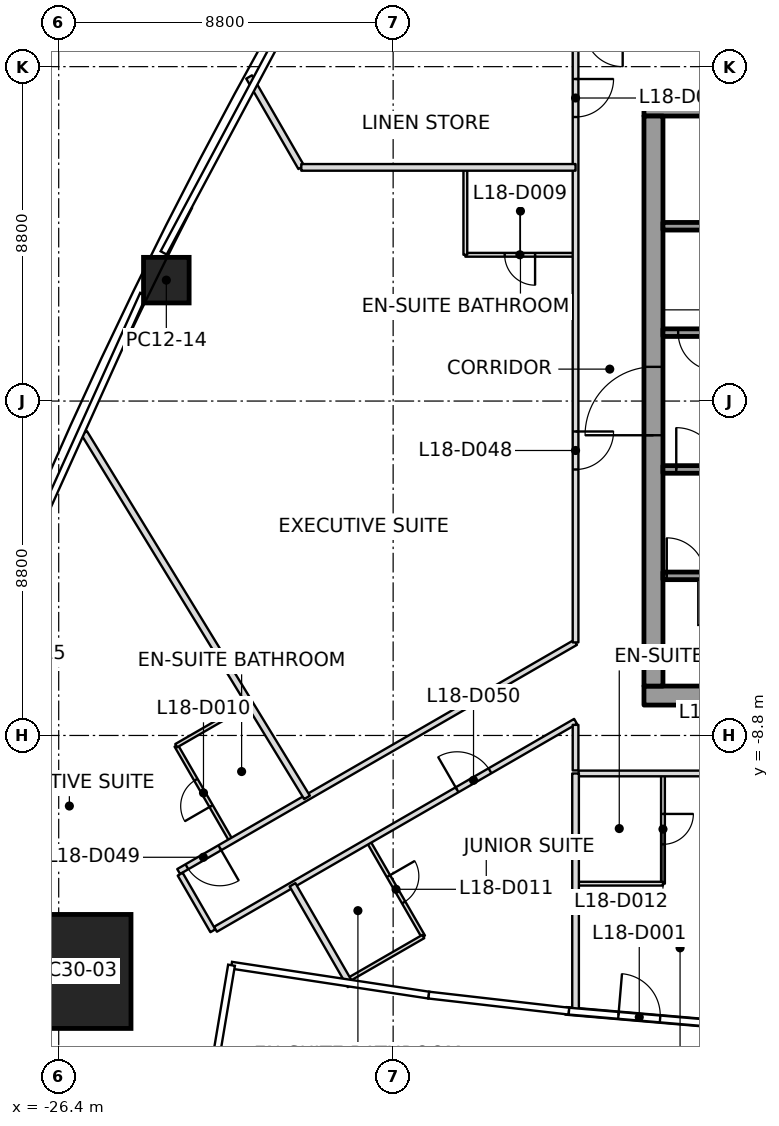
"""IFC4 building model, lengths in metres.
Left out: names, types, materials, properties, quantities, classifications, styles, units other than length and angle.
Written with IfcOpenShell. Run it as: python <this file> out.ifc"""

import sys

from ifc_helpers import new_model, si_unit, direction, frame, frame_2d, origin, origin_2d, place, context, subcontext, project, spatial, rectangle, extrude, element, fill, save


model = new_model("IFC4")
c1 = context("Model", 3, precision=1e-05, world=origin(), true_north=direction((0.0, 1.0)))
c2 = subcontext(c1, "Body", "Model", "MODEL_VIEW")
j1 = project(units=[si_unit("LENGTHUNIT", "METRE"), si_unit("PLANEANGLEUNIT", "RADIAN")], contexts=[c1])
p1 = place(None, origin())
s1 = spatial("IfcSite", under=j1, at=p1, CompositionType="ELEMENT")
p2 = place(p1, origin())
s2 = spatial("IfcBuilding", under=s1, at=p2, CompositionType="ELEMENT")
p3 = place(p2, frame((0.0, 0.0, 88.7)))
s3 = spatial("IfcBuildingStorey", under=s2, at=p3, CompositionType="ELEMENT", Elevation=88.7)
p4 = place(p3, frame((-25.998, -15.01, 0.0), z_axis=(0.030466109479, 0.017607037296, 0.999380712447), x_axis=(0.999535800346, -0.000536667047, -0.03046138236)))
e1 = element("IfcColumn", 1, at=p4, inside=s3, PredefinedType="COLUMN", context=c2, shape_type="SweptSolid", body=[
    extrude(rectangle(XDim=3.0, YDim=3.0, at=origin_2d()), origin(), (0.0, 0.0, 1.0), 3.702),
])
p5 = place(p3, frame((-23.568, 3.182, 0.0), z_axis=(0.015240683228, 0.002309194428, 0.99988118754), x_axis=(0.441368451021, 0.897282817129, -0.008799802757)))
e2 = element("IfcColumn", 2, at=p5, inside=s3, PredefinedType="COLUMN", context=c2, shape_type="SweptSolid", body=[
    extrude(rectangle(XDim=1.2, YDim=1.2, at=origin_2d()), origin(), (0.0, 0.0, 1.0), 3.7),
])
p6 = place(p3, frame((-27.284, -5.052, 0.0), z_axis=(0.019460669214, 0.010950749456, 0.999750650632), x_axis=(0.380819123517, 0.924483192548, -0.017539152187)))
e3 = element("IfcColumn", 3, at=p6, inside=s3, PredefinedType="COLUMN", context=c2, shape_type="SweptSolid", body=[
    extrude(rectangle(XDim=1.2, YDim=1.2, at=origin_2d()), origin(), (0.0, 0.0, 1.0), 3.701),
])
p7 = place(p3, frame((-11.0, -7.75, 0.0), z_axis=(0.0, 0.0, 1.0), x_axis=(1.0, 0.0, 0.0)))
e4 = element("IfcWall", 4, at=p7, inside=s3, PredefinedType="SHEAR", context=c2, shape_type="SweptSolid", body=[
    extrude(rectangle(XDim=22.0, YDim=0.5, at=frame_2d((11.0, 0.0))), origin(), (0.0, 0.0, 1.0), 3.7),
])
p8 = place(p7, frame((10.45, 0.0, 0.0)))
e5 = element("IfcOpeningElement", 5, at=p8, cuts=e4, PredefinedType="OPENING", context=c2, shape_type="SweptSolid", body=[
    extrude(rectangle(XDim=1.1, YDim=2.1, at=frame_2d((0.55, 1.05))), frame((0.0, 0.25, 0.0), z_axis=(0.0, -1.0, 0.0), x_axis=(1.0, 0.0, 0.0)), (0.0, 0.0, 1.0), 0.5),
])
p9 = place(p3, frame((-11.0, 7.75, 0.0), z_axis=(0.0, 0.0, 1.0), x_axis=(1.0, 0.0, 0.0)))
e6 = element("IfcWall", 6, at=p9, inside=s3, PredefinedType="SHEAR", context=c2, shape_type="SweptSolid", body=[
    extrude(rectangle(XDim=22.0, YDim=0.5, at=frame_2d((11.0, 0.0))), origin(), (0.0, 0.0, 1.0), 3.7),
])
p10 = place(p9, frame((10.45, 0.0, 0.0)))
e7 = element("IfcOpeningElement", 7, at=p10, cuts=e6, PredefinedType="OPENING", context=c2, shape_type="SweptSolid", body=[
    extrude(rectangle(XDim=1.1, YDim=2.1, at=frame_2d((0.55, 1.05))), frame((0.0, 0.25, 0.0), z_axis=(0.0, -1.0, 0.0), x_axis=(1.0, 0.0, 0.0)), (0.0, 0.0, 1.0), 0.5),
])
p11 = place(p3, frame((-10.75, -7.5, 0.0), z_axis=(0.0, 0.0, 1.0), x_axis=(0.0, 1.0, 0.0)))
e8 = element("IfcWall", 8, at=p11, inside=s3, PredefinedType="SHEAR", context=c2, shape_type="SweptSolid", body=[
    extrude(rectangle(XDim=15.0, YDim=0.5, at=frame_2d((7.5, 0.0))), origin(), (0.0, 0.0, 1.0), 3.7),
])
p12 = place(p11, frame((6.6, 0.0, 0.0)))
e9 = element("IfcOpeningElement", 9, at=p12, cuts=e8, PredefinedType="OPENING", context=c2, shape_type="SweptSolid", body=[
    extrude(rectangle(XDim=1.8, YDim=2.1, at=frame_2d((0.9, 1.05))), frame((0.0, 0.25, 0.0), z_axis=(0.0, -1.0, 0.0), x_axis=(1.0, 0.0, 0.0)), (0.0, 0.0, 1.0), 0.5),
])
p13 = place(p3, frame((-13.063, -16.047, 0.0), z_axis=(0.0, 0.0, 1.0), x_axis=(0.996355943682, -0.085292634444, 0.0)))
e10 = element("IfcWall", 10, at=p13, inside=s3, PredefinedType="SOLIDWALL", context=c2, shape_type="SweptSolid", body=[
    extrude(rectangle(XDim=3.893, YDim=0.2, at=frame_2d((1.946, 0.0))), origin(), (0.0, 0.0, 1.0), 3.017),
])
p14 = place(p13, frame((1.396, 0.0, 0.0)))
e11 = element("IfcOpeningElement", 11, at=p14, cuts=e10, PredefinedType="OPENING", context=c2, shape_type="SweptSolid", body=[
    extrude(rectangle(XDim=1.1, YDim=2.1, at=frame_2d((0.55, 1.05))), frame((0.0, 0.1, 0.0), z_axis=(0.0, -1.0, 0.0), x_axis=(1.0, 0.0, 0.0)), (0.0, 0.0, 1.0), 0.2),
])
p15 = place(p3, frame((-10.5, -4.6, 0.0), z_axis=(0.0, 0.0, 1.0), x_axis=(1.0, 0.0, 0.0)))
e12 = element("IfcWall", 12, at=p15, inside=s3, PredefinedType="SOLIDWALL", context=c2, shape_type="SweptSolid", body=[
    extrude(rectangle(XDim=1.8, YDim=0.2, at=frame_2d((0.9, 0.0))), origin(), (0.0, 0.0, 1.0), 3.55),
])
p16 = place(p15, frame((0.1, 0.0, 0.0)))
e13 = element("IfcOpeningElement", 13, at=p16, cuts=e12, PredefinedType="OPENING", context=c2, shape_type="SweptSolid", body=[
    extrude(rectangle(XDim=1.0, YDim=2.1, at=frame_2d((0.5, 1.05))), frame((0.0, 0.1, 0.0), z_axis=(0.0, -1.0, 0.0), x_axis=(1.0, 0.0, 0.0)), (0.0, 0.0, 1.0), 0.2),
])
p17 = place(p3, frame((-10.5, -1.8, 0.0), z_axis=(0.0, 0.0, 1.0), x_axis=(1.0, 0.0, 0.0)))
e14 = element("IfcWall", 14, at=p17, inside=s3, PredefinedType="SOLIDWALL", context=c2, shape_type="SweptSolid", body=[
    extrude(rectangle(XDim=1.8, YDim=0.2, at=frame_2d((0.9, 0.0))), origin(), (0.0, 0.0, 1.0), 3.55),
])
p18 = place(p17, frame((0.35, 0.0, 0.0)))
e15 = element("IfcOpeningElement", 15, at=p18, cuts=e14, PredefinedType="OPENING", context=c2, shape_type="SweptSolid", body=[
    extrude(rectangle(XDim=1.1, YDim=2.1, at=frame_2d((0.55, 1.05))), frame((0.0, 0.1, 0.0), z_axis=(0.0, -1.0, 0.0), x_axis=(1.0, 0.0, 0.0)), (0.0, 0.0, 1.0), 0.2),
])
p19 = place(p3, frame((-8.7, 1.8, 0.0), z_axis=(0.0, 0.0, 1.0), x_axis=(-1.0, 0.0, 0.0)))
e16 = element("IfcWall", 16, at=p19, inside=s3, PredefinedType="SOLIDWALL", context=c2, shape_type="SweptSolid", body=[
    extrude(rectangle(XDim=1.8, YDim=0.2, at=frame_2d((0.9, 0.0))), origin(), (0.0, 0.0, 1.0), 3.55),
])
p20 = place(p19, frame((0.4, 0.0, 0.0)))
e17 = element("IfcOpeningElement", 17, at=p20, cuts=e16, PredefinedType="OPENING", context=c2, shape_type="SweptSolid", body=[
    extrude(rectangle(XDim=1.0, YDim=2.1, at=frame_2d((0.5, 1.05))), frame((0.0, 0.1, 0.0), z_axis=(0.0, -1.0, 0.0), x_axis=(1.0, 0.0, 0.0)), (0.0, 0.0, 1.0), 0.2),
])
p21 = place(p3, frame((-8.7, 4.6, 0.0), z_axis=(0.0, 0.0, 1.0), x_axis=(-1.0, 0.0, 0.0)))
e18 = element("IfcWall", 18, at=p21, inside=s3, PredefinedType="SOLIDWALL", context=c2, shape_type="SweptSolid", body=[
    extrude(rectangle(XDim=1.8, YDim=0.2, at=frame_2d((0.9, 0.0))), origin(), (0.0, 0.0, 1.0), 3.55),
])
p22 = place(p3, frame((-19.866, -10.43, 0.0), z_axis=(0.0, 0.0, 1.0), x_axis=(-0.521604569483, 0.853187361073, 0.0)))
e19 = element("IfcWall", 19, at=p22, inside=s3, PredefinedType="PARTITIONING", context=c2, shape_type="SweptSolid", body=[
    extrude(rectangle(XDim=11.245, YDim=0.175, at=frame_2d((5.622, 0.0))), origin(), (0.0, 0.0, 1.0), 2.934),
])
p23 = place(p3, frame((-21.39, 8.528, 0.0), z_axis=(0.0, 0.0, 1.0), x_axis=(0.500058417122, -0.865991674016, 0.0)))
e20 = element("IfcWall", 20, at=p23, inside=s3, PredefinedType="PARTITIONING", context=c2, shape_type="SweptSolid", body=[
    extrude(rectangle(XDim=2.747, YDim=0.175, at=frame_2d((1.374, 0.0))), origin(), (0.0, 0.0, 1.0), 2.934),
])
p24 = place(p3, frame((-20.017, 6.149, 0.0), z_axis=(0.0, 0.0, 1.0), x_axis=(1.0, 0.0, 0.0)))
e21 = element("IfcWall", 21, at=p24, inside=s3, PredefinedType="PARTITIONING", context=c2, shape_type="SweptSolid", body=[
    extrude(rectangle(XDim=7.217, YDim=0.175, at=frame_2d((3.608, 0.0))), origin(), (0.0, 0.0, 1.0), 3.093),
])
p25 = place(p3, frame((-20.248, -12.729, 0.0), z_axis=(0.0, 0.0, 1.0), x_axis=(0.499957248001, -0.866050085256, 0.0)))
e22 = element("IfcWall", 22, at=p25, inside=s3, PredefinedType="PARTITIONING", context=c2, shape_type="SweptSolid", body=[
    extrude(rectangle(XDim=3.06, YDim=0.175, at=frame_2d((1.53, 0.0))), origin(), (0.0, 0.0, 1.0), 3.15),
])
p26 = place(p3, frame((-12.8, -9.8, 0.0), z_axis=(0.0, 0.0, 1.0), x_axis=(0.0, -1.0, 0.0)))
e23 = element("IfcWall", 23, at=p26, inside=s3, PredefinedType="PARTITIONING", context=c2, shape_type="SweptSolid", body=[
    extrude(rectangle(XDim=6.271, YDim=0.175, at=frame_2d((3.135, 0.0))), origin(), (0.0, 0.0, 1.0), 3.15),
])
p27 = place(p3, frame((-12.8, -6.351, 0.0), z_axis=(0.0, 0.0, 1.0), x_axis=(-0.86602308164, -0.500004022051, 0.0)))
e24 = element("IfcWall", 24, at=p27, inside=s3, PredefinedType="PARTITIONING", context=c2, shape_type="SweptSolid", body=[
    extrude(rectangle(XDim=12.059, YDim=0.15, at=frame_2d((6.03, 0.0))), origin(), (0.0, 0.0, 1.0), 2.947),
])
p28 = place(p27, frame((10.809, 0.0, 0.0)))
e25 = element("IfcOpeningElement", 25, at=p28, cuts=e24, PredefinedType="OPENING", context=c2, shape_type="SweptSolid", body=[
    extrude(rectangle(XDim=1.0, YDim=2.1, at=frame_2d((0.5, 1.05))), frame((0.0, 0.075, 0.0), z_axis=(0.0, -1.0, 0.0), x_axis=(1.0, 0.0, 0.0)), (0.0, 0.0, 1.0), 0.15),
])
p29 = place(p3, frame((-23.204, -12.45, 0.0), z_axis=(0.0, 0.0, 1.0), x_axis=(0.500062383118, -0.865989383878, 0.0)))
e26 = element("IfcWall", 26, at=p29, inside=s3, PredefinedType="PARTITIONING", context=c2, shape_type="SweptSolid", body=[
    extrude(rectangle(XDim=1.72, YDim=0.15, at=frame_2d((0.86, 0.0))), origin(), (0.0, 0.0, 1.0), 2.797),
])
p30 = place(p3, frame((-22.274, -13.899, 0.0), z_axis=(0.0, 0.0, 1.0), x_axis=(0.866012401956, 0.500022519152, 0.0)))
e27 = element("IfcWall", 27, at=p30, inside=s3, PredefinedType="PARTITIONING", context=c2, shape_type="SweptSolid", body=[
    extrude(rectangle(XDim=10.94, YDim=0.15, at=frame_2d((5.47, 0.0))), origin(), (0.0, 0.0, 1.0), 2.797),
])
p31 = place(p30, frame((7.34, 0.0, 0.0)))
e28 = element("IfcOpeningElement", 28, at=p31, cuts=e27, PredefinedType="OPENING", context=c2, shape_type="SweptSolid", body=[
    extrude(rectangle(XDim=1.0, YDim=2.1, at=frame_2d((0.5, 1.05))), frame((0.0, 0.075, 0.0), z_axis=(0.0, -1.0, 0.0), x_axis=(1.0, 0.0, 0.0)), (0.0, 0.0, 1.0), 0.15),
])
p32 = place(p3, frame((-12.8, -8.521, 0.0), z_axis=(0.0, 0.0, 1.0), x_axis=(0.0, -1.0, 0.0)))
e29 = element("IfcWall", 29, at=p32, inside=s3, PredefinedType="PARTITIONING", context=c2, shape_type="SweptSolid", body=[
    extrude(rectangle(XDim=1.199, YDim=0.15, at=frame_2d((0.6, 0.0))), origin(), (0.0, 0.0, 1.0), 2.797),
])
p33 = place(p3, frame((-12.8, 9.72, 0.0), z_axis=(0.0, 0.0, 1.0), x_axis=(0.0, -1.0, 0.0)))
e30 = element("IfcWall", 30, at=p33, inside=s3, PredefinedType="PARTITIONING", context=c2, shape_type="SweptSolid", body=[
    extrude(rectangle(XDim=16.071, YDim=0.15, at=frame_2d((8.035, 0.0))), origin(), (0.0, 0.0, 1.0), 2.947),
])
p34 = place(p33, frame((1.245, 0.0, 0.0)))
e31 = element("IfcOpeningElement", 31, at=p34, cuts=e30, PredefinedType="OPENING", context=c2, shape_type="SweptSolid", body=[
    extrude(rectangle(XDim=1.0, YDim=2.1, at=frame_2d((0.5, 1.05))), frame((0.0, 0.075, 0.0), z_axis=(0.0, -1.0, 0.0), x_axis=(1.0, 0.0, 0.0)), (0.0, 0.0, 1.0), 0.15),
])
p35 = place(p33, frame((10.521, 0.0, 0.0)))
e32 = element("IfcOpeningElement", 32, at=p35, cuts=e30, PredefinedType="OPENING", context=c2, shape_type="SweptSolid", body=[
    extrude(rectangle(XDim=1.0, YDim=2.1, at=frame_2d((0.5, 1.05))), frame((0.0, 0.075, 0.0), z_axis=(0.0, -1.0, 0.0), x_axis=(1.0, 0.0, 0.0)), (0.0, 0.0, 1.0), 0.15),
])
p36 = place(p3, frame((-12.72, -9.8, 0.0), z_axis=(0.0, 0.0, 1.0), x_axis=(1.0, 0.0, 0.0)))
e33 = element("IfcWall", 33, at=p36, inside=s3, PredefinedType="PARTITIONING", context=c2, shape_type="SweptSolid", body=[
    extrude(rectangle(XDim=9.22, YDim=0.15, at=frame_2d((4.61, 0.0))), origin(), (0.0, 0.0, 1.0), 3.017),
])
p37 = place(p36, frame((3.37, 0.0, 0.0)))
e34 = element("IfcOpeningElement", 34, at=p37, cuts=e33, PredefinedType="OPENING", context=c2, shape_type="SweptSolid", body=[
    extrude(rectangle(XDim=1.0, YDim=2.1, at=frame_2d((0.5, 1.05))), frame((0.0, 0.075, 0.0), z_axis=(0.0, -1.0, 0.0), x_axis=(1.0, 0.0, 0.0)), (0.0, 0.0, 1.0), 0.15),
])
p38 = place(p36, frame((8.02, 0.0, 0.0)))
e35 = element("IfcOpeningElement", 35, at=p38, cuts=e33, PredefinedType="OPENING", context=c2, shape_type="SweptSolid", body=[
    extrude(rectangle(XDim=1.0, YDim=2.1, at=frame_2d((0.5, 1.05))), frame((0.0, 0.075, 0.0), z_axis=(0.0, -1.0, 0.0), x_axis=(1.0, 0.0, 0.0)), (0.0, 0.0, 1.0), 0.15),
])
p39 = place(p3, frame((-21.873, -11.554, 0.0), z_axis=(0.0, 0.0, 1.0), x_axis=(-0.499999802827, 0.866025517622, 0.0)))
e36 = element("IfcWall", 36, at=p39, inside=s3, PredefinedType="PARTITIONING", context=c2, shape_type="SweptSolid", body=[
    extrude(rectangle(XDim=2.87, YDim=0.1, at=frame_2d((1.435, 0.0))), origin(), (0.0, 0.0, 1.0), 3.15),
])
p40 = place(p39, frame((1.035, 0.0, 0.0)))
e37 = element("IfcOpeningElement", 37, at=p40, cuts=e36, PredefinedType="OPENING", context=c2, shape_type="SweptSolid", body=[
    extrude(rectangle(XDim=0.8, YDim=2.1, at=frame_2d((0.4, 1.05))), frame((0.0, 0.05, 0.0), z_axis=(0.0, -1.0, 0.0), x_axis=(1.0, 0.0, 0.0)), (0.0, 0.0, 1.0), 0.1),
])
p41 = place(p3, frame((-23.308, -9.069, 0.0), z_axis=(0.0, 0.0, 1.0), x_axis=(0.866017224141, 0.500014167291, 0.0)))
e38 = element("IfcWall", 38, at=p41, inside=s3, PredefinedType="PARTITIONING", context=c2, shape_type="SweptSolid", body=[
    extrude(rectangle(XDim=2.27, YDim=0.1, at=frame_2d((1.135, 0.0))), origin(), (0.0, 0.0, 1.0), 3.15),
])
p42 = place(p3, frame((-18.241, -11.605, 0.0), z_axis=(0.0, 0.0, 1.0), x_axis=(0.499999802827, -0.866025517622, 0.0)))
e39 = element("IfcWall", 39, at=p42, inside=s3, PredefinedType="PARTITIONING", context=c2, shape_type="SweptSolid", body=[
    extrude(rectangle(XDim=2.87, YDim=0.1, at=frame_2d((1.435, 0.0))), origin(), (0.0, 0.0, 1.0), 2.797),
])
p43 = place(p42, frame((1.035, 0.0, 0.0)))
e40 = element("IfcOpeningElement", 40, at=p43, cuts=e39, PredefinedType="OPENING", context=c2, shape_type="SweptSolid", body=[
    extrude(rectangle(XDim=0.8, YDim=2.1, at=frame_2d((0.4, 1.05))), frame((0.0, 0.05, 0.0), z_axis=(0.0, -1.0, 0.0), x_axis=(1.0, 0.0, 0.0)), (0.0, 0.0, 1.0), 0.1),
])
p44 = place(p3, frame((-16.806, -14.091, 0.0), z_axis=(0.0, 0.0, 1.0), x_axis=(-0.866017224141, -0.500014167291, 0.0)))
e41 = element("IfcWall", 41, at=p44, inside=s3, PredefinedType="PARTITIONING", context=c2, shape_type="SweptSolid", body=[
    extrude(rectangle(XDim=2.27, YDim=0.1, at=frame_2d((1.135, 0.0))), origin(), (0.0, 0.0, 1.0), 3.15),
])
p45 = place(p3, frame((-12.83, 3.849, 0.0), z_axis=(0.0, 0.0, 1.0), x_axis=(-1.0, 0.0, 0.0)))
e42 = element("IfcWall", 42, at=p45, inside=s3, PredefinedType="PARTITIONING", context=c2, shape_type="SweptSolid", body=[
    extrude(rectangle(XDim=2.87, YDim=0.1, at=frame_2d((1.435, 0.0))), origin(), (0.0, 0.0, 1.0), 3.15),
])
p46 = place(p45, frame((1.035, 0.0, 0.0)))
e43 = element("IfcOpeningElement", 43, at=p46, cuts=e42, PredefinedType="OPENING", context=c2, shape_type="SweptSolid", body=[
    extrude(rectangle(XDim=0.8, YDim=2.1, at=frame_2d((0.4, 1.05))), frame((0.0, 0.05, 0.0), z_axis=(0.0, -1.0, 0.0), x_axis=(1.0, 0.0, 0.0)), (0.0, 0.0, 1.0), 0.1),
])
p47 = place(p3, frame((-15.7, 3.849, 0.0), z_axis=(0.0, 0.0, 1.0), x_axis=(0.0, 1.0, 0.0)))
e44 = element("IfcWall", 44, at=p47, inside=s3, PredefinedType="PARTITIONING", context=c2, shape_type="SweptSolid", body=[
    extrude(rectangle(XDim=2.27, YDim=0.1, at=frame_2d((1.135, 0.0))), origin(), (0.0, 0.0, 1.0), 3.15),
])
p48 = place(p3, frame((-10.5, -9.83, 0.0), z_axis=(0.0, 0.0, 1.0), x_axis=(0.0, -1.0, 0.0)))
e45 = element("IfcWall", 45, at=p48, inside=s3, PredefinedType="PARTITIONING", context=c2, shape_type="SweptSolid", body=[
    extrude(rectangle(XDim=2.87, YDim=0.1, at=frame_2d((1.435, 0.0))), origin(), (0.0, 0.0, 1.0), 3.15),
])
p49 = place(p48, frame((1.035, 0.0, 0.0)))
e46 = element("IfcOpeningElement", 46, at=p49, cuts=e45, PredefinedType="OPENING", context=c2, shape_type="SweptSolid", body=[
    extrude(rectangle(XDim=0.8, YDim=2.1, at=frame_2d((0.4, 1.05))), frame((0.0, 0.05, 0.0), z_axis=(0.0, -1.0, 0.0), x_axis=(1.0, 0.0, 0.0)), (0.0, 0.0, 1.0), 0.1),
])
p50 = place(p3, frame((-10.5, -12.7, 0.0), z_axis=(0.0, 0.0, 1.0), x_axis=(-1.0, 0.0, 0.0)))
e47 = element("IfcWall", 47, at=p50, inside=s3, PredefinedType="PARTITIONING", context=c2, shape_type="SweptSolid", body=[
    extrude(rectangle(XDim=2.27, YDim=0.1, at=frame_2d((1.135, 0.0))), origin(), (0.0, 0.0, 1.0), 3.017),
])
p51 = place(p14, origin())
e48 = element("IfcDoor", 48, at=p51, inside=s3, OperationType="SINGLE_SWING_RIGHT", PredefinedType="DOOR", context=c2, shape_type="SweptSolid", body=[
    extrude(rectangle(XDim=1.1, YDim=2.1, at=frame_2d((0.55, 1.05))), frame((0.0, 0.025, 0.0), z_axis=(0.0, -1.0, 0.0), x_axis=(1.0, 0.0, 0.0)), (0.0, 0.0, 1.0), 0.05),
])
fill(e11, e48)
p52 = place(p34, origin())
e49 = element("IfcDoor", 49, at=p52, inside=s3, OperationType="SINGLE_SWING_LEFT", PredefinedType="DOOR", context=c2, shape_type="SweptSolid", body=[
    extrude(rectangle(XDim=1.0, YDim=2.1, at=frame_2d((0.5, 1.05))), frame((0.0, 0.025, 0.0), z_axis=(0.0, -1.0, 0.0), x_axis=(1.0, 0.0, 0.0)), (0.0, 0.0, 1.0), 0.05),
])
fill(e31, e49)
p53 = place(p35, origin())
e50 = element("IfcDoor", 50, at=p53, inside=s3, OperationType="SINGLE_SWING_RIGHT", PredefinedType="DOOR", context=c2, shape_type="SweptSolid", body=[
    extrude(rectangle(XDim=1.0, YDim=2.1, at=frame_2d((0.5, 1.05))), frame((0.0, 0.025, 0.0), z_axis=(0.0, -1.0, 0.0), x_axis=(1.0, 0.0, 0.0)), (0.0, 0.0, 1.0), 0.05),
])
fill(e32, e50)
p54 = place(p46, origin())
e51 = element("IfcDoor", 51, at=p54, inside=s3, OperationType="SINGLE_SWING_LEFT", PredefinedType="DOOR", context=c2, shape_type="SweptSolid", body=[
    extrude(rectangle(XDim=0.8, YDim=2.1, at=frame_2d((0.4, 1.05))), frame((0.0, 0.025, 0.0), z_axis=(0.0, -1.0, 0.0), x_axis=(1.0, 0.0, 0.0)), (0.0, 0.0, 1.0), 0.05),
])
fill(e43, e51)
p55 = place(p28, origin())
e52 = element("IfcDoor", 52, at=p55, inside=s3, OperationType="SINGLE_SWING_LEFT", PredefinedType="DOOR", context=c2, shape_type="SweptSolid", body=[
    extrude(rectangle(XDim=1.0, YDim=2.1, at=frame_2d((0.5, 1.05))), frame((0.0, 0.025, 0.0), z_axis=(0.0, -1.0, 0.0), x_axis=(1.0, 0.0, 0.0)), (0.0, 0.0, 1.0), 0.05),
])
fill(e25, e52)
p56 = place(p40, origin())
e53 = element("IfcDoor", 53, at=p56, inside=s3, OperationType="SINGLE_SWING_RIGHT", PredefinedType="DOOR", context=c2, shape_type="SweptSolid", body=[
    extrude(rectangle(XDim=0.8, YDim=2.1, at=frame_2d((0.4, 1.05))), frame((0.0, 0.025, 0.0), z_axis=(0.0, -1.0, 0.0), x_axis=(1.0, 0.0, 0.0)), (0.0, 0.0, 1.0), 0.05),
])
fill(e37, e53)
p57 = place(p31, origin())
e54 = element("IfcDoor", 54, at=p57, inside=s3, OperationType="SINGLE_SWING_LEFT", PredefinedType="DOOR", context=c2, shape_type="SweptSolid", body=[
    extrude(rectangle(XDim=1.0, YDim=2.1, at=frame_2d((0.5, 1.05))), frame((0.0, 0.025, 0.0), z_axis=(0.0, -1.0, 0.0), x_axis=(1.0, 0.0, 0.0)), (0.0, 0.0, 1.0), 0.05),
])
fill(e28, e54)
p58 = place(p43, origin())
e55 = element("IfcDoor", 55, at=p58, inside=s3, OperationType="SINGLE_SWING_RIGHT", PredefinedType="DOOR", context=c2, shape_type="SweptSolid", body=[
    extrude(rectangle(XDim=0.8, YDim=2.1, at=frame_2d((0.4, 1.05))), frame((0.0, 0.025, 0.0), z_axis=(0.0, -1.0, 0.0), x_axis=(1.0, 0.0, 0.0)), (0.0, 0.0, 1.0), 0.05),
])
fill(e40, e55)
p59 = place(p49, origin())
e56 = element("IfcDoor", 56, at=p59, inside=s3, OperationType="SINGLE_SWING_RIGHT", PredefinedType="DOOR", context=c2, shape_type="SweptSolid", body=[
    extrude(rectangle(XDim=0.8, YDim=2.1, at=frame_2d((0.4, 1.05))), frame((0.0, 0.025, 0.0), z_axis=(0.0, -1.0, 0.0), x_axis=(1.0, 0.0, 0.0)), (0.0, 0.0, 1.0), 0.05),
])
fill(e46, e56)
p60 = place(p18, origin())
e57 = element("IfcDoor", 57, at=p60, inside=s3, OperationType="SINGLE_SWING_RIGHT", PredefinedType="DOOR", context=c2, shape_type="SweptSolid", body=[
    extrude(rectangle(XDim=1.1, YDim=2.1, at=frame_2d((0.55, 1.05))), frame((0.0, 0.025, 0.0), z_axis=(0.0, -1.0, 0.0), x_axis=(1.0, 0.0, 0.0)), (0.0, 0.0, 1.0), 0.05),
])
fill(e15, e57)
p61 = place(p20, origin())
e58 = element("IfcDoor", 58, at=p61, inside=s3, OperationType="SINGLE_SWING_RIGHT", PredefinedType="DOOR", context=c2, shape_type="SweptSolid", body=[
    extrude(rectangle(XDim=1.0, YDim=2.1, at=frame_2d((0.5, 1.05))), frame((0.0, 0.025, 0.0), z_axis=(0.0, -1.0, 0.0), x_axis=(1.0, 0.0, 0.0)), (0.0, 0.0, 1.0), 0.05),
])
fill(e17, e58)
p62 = place(p16, origin())
e59 = element("IfcDoor", 59, at=p62, inside=s3, OperationType="SINGLE_SWING_LEFT", PredefinedType="DOOR", context=c2, shape_type="SweptSolid", body=[
    extrude(rectangle(XDim=1.0, YDim=2.1, at=frame_2d((0.5, 1.05))), frame((0.0, 0.025, 0.0), z_axis=(0.0, -1.0, 0.0), x_axis=(1.0, 0.0, 0.0)), (0.0, 0.0, 1.0), 0.05),
])
fill(e13, e59)
p63 = place(p12, origin())
e60 = element("IfcDoor", 60, at=p63, inside=s3, OperationType="DOUBLE_DOOR_SINGLE_SWING", PredefinedType="DOOR", context=c2, shape_type="SweptSolid", body=[
    extrude(rectangle(XDim=1.8, YDim=2.1, at=frame_2d((0.9, 1.05))), frame((0.0, 0.025, 0.0), z_axis=(0.0, -1.0, 0.0), x_axis=(1.0, 0.0, 0.0)), (0.0, 0.0, 1.0), 0.05),
])
fill(e9, e60)
save(model, sys.argv[1])
